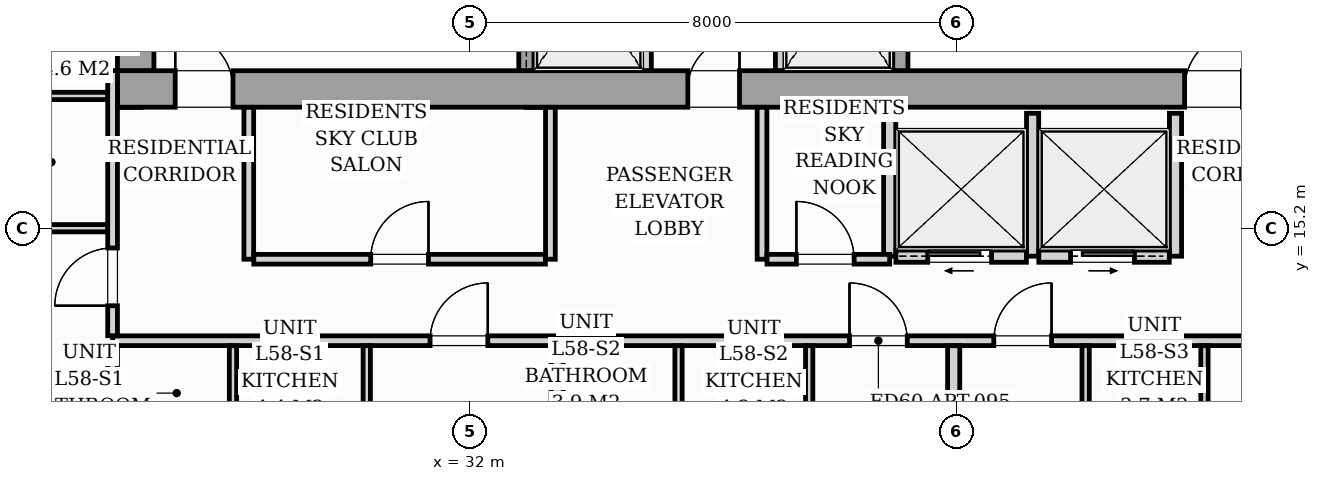
"""IFC4 building model, lengths in metres.
Left out: names, types, materials, properties, quantities, classifications, styles, units other than length and angle.
Written with IfcOpenShell. Run it as: python <this file> out.ifc"""

import sys

from ifc_helpers import new_model, si_unit, direction, frame, frame_2d, origin, origin_2d, place, context, subcontext, project, spatial, rectangle, i_section, extrude, source, transform, mapped, element, fill, save


model = new_model("IFC4")
c1 = context("Model", 3, precision=1e-05, world=origin(), true_north=direction((0.0, 1.0)))
c2 = subcontext(c1, "Body", "Model", "MODEL_VIEW")
j1 = project(units=[si_unit("LENGTHUNIT", "METRE"), si_unit("PLANEANGLEUNIT", "RADIAN")], contexts=[c1])
p1 = place(None, origin())
s1 = spatial("IfcSite", under=j1, at=p1, CompositionType="ELEMENT")
p2 = place(p1, origin())
s2 = spatial("IfcBuilding", under=s1, at=p2, CompositionType="ELEMENT")
p3 = place(p2, frame((0.0, 0.0, 201.8)))
s3 = spatial("IfcBuildingStorey", under=s2, at=p3, CompositionType="ELEMENT", Elevation=201.8)
m1 = source(origin(), c2, "Body", "SweptSolid", [
    extrude(i_section(OverallWidth=0.416, OverallDepth=0.446, WebThickness=0.039, FlangeThickness=0.063, FilletRadius=0.018, at=origin_2d()), origin(), (0.0, 0.0, 1.0), 3.196),
])
for number, where, z_axis, x_axis in (
    (1, (26.4, 17.4, 0.002), (0.0, 0.0, 1.0), (1.0, 0.0, 0.0)),
    (2, (33.12, 17.4, 0.002), (0.0, 0.0, 1.0), (1.0, 0.0, 0.0)),
    (3, (38.88, 17.4, 0.002), (0.0, 0.0, 1.0), (1.0, 0.0, 0.0)),
):
    element("IfcColumn", number, at=place(p3, frame(where, z_axis=z_axis, x_axis=x_axis)), inside=s3, PredefinedType="PILASTER", context=c2, shape_type="MappedRepresentation", body=[
        mapped(m1, transform((0.0, 0.0, 0.0), scale=1.0)),
    ])
p4 = place(p3, frame((26.2, 17.5, 0.0), z_axis=(0.0, 0.0, 1.0), x_axis=(1.0, 0.0, 0.0)))
e4 = element("IfcWall", 4, at=p4, inside=s3, PredefinedType="SHEAR", context=c2, shape_type="SweptSolid", body=[
    extrude(rectangle(XDim=19.6, YDim=0.6, at=frame_2d((9.8, 0.0))), origin(), (0.0, 0.0, 1.0), 3.2),
])
p5 = place(p4, frame((0.95, 0.0, 0.0)))
e5 = element("IfcOpeningElement", 5, at=p5, cuts=e4, PredefinedType="OPENING", context=c2, shape_type="SweptSolid", body=[
    extrude(rectangle(XDim=0.95, YDim=2.06, at=frame_2d((0.475, 1.03))), frame((0.0, 0.31, 0.0), z_axis=(0.0, -1.0, 0.0), x_axis=(1.0, 0.0, 0.0)), (0.0, 0.0, 1.0), 0.62),
])
p6 = place(p4, frame((9.38, 0.0, 0.0)))
e6 = element("IfcOpeningElement", 6, at=p6, cuts=e4, PredefinedType="OPENING", context=c2, shape_type="SweptSolid", body=[
    extrude(rectangle(XDim=0.85, YDim=2.0, at=frame_2d((0.425, 1.0))), frame((0.0, 0.31, 0.0), z_axis=(0.0, -1.0, 0.0), x_axis=(1.0, 0.0, 0.0)), (0.0, 0.0, 1.0), 0.62),
])
p7 = place(p4, frame((17.55, 0.0, 0.0)))
e7 = element("IfcOpeningElement", 7, at=p7, cuts=e4, PredefinedType="OPENING", context=c2, shape_type="SweptSolid", body=[
    extrude(rectangle(XDim=0.95, YDim=2.06, at=frame_2d((0.475, 1.03))), frame((0.0, 0.31, 0.0), z_axis=(0.0, -1.0, 0.0), x_axis=(1.0, 0.0, 0.0)), (0.0, 0.0, 1.0), 0.62),
])
p8 = place(p3, frame((26.5, 17.802, 0.0), z_axis=(0.0, 0.0, 1.0), x_axis=(0.0, 1.0, 0.0)))
e8 = element("IfcWall", 8, at=p8, inside=s3, PredefinedType="SHEAR", context=c2, shape_type="SweptSolid", body=[
    extrude(rectangle(XDim=5.796, YDim=0.6, at=frame_2d((2.898, 0.0))), origin(), (0.0, 0.0, 1.0), 3.2),
])
p9 = place(p3, frame((32.925, 17.802, 0.0), z_axis=(0.0, 0.0, 1.0), x_axis=(0.0, 1.0, 0.0)))
e9 = element("IfcWall", 9, at=p9, inside=s3, PredefinedType="SOLIDWALL", context=c2, shape_type="SweptSolid", body=[
    extrude(rectangle(XDim=2.646, YDim=0.25, at=frame_2d((1.323, 0.0))), origin(), (0.0, 0.0, 1.0), 3.2),
])
p10 = place(p9, frame((0.548, 0.0, 0.0)))
e10 = element("IfcOpeningElement", 10, at=p10, cuts=e9, PredefinedType="OPENING", context=c2, shape_type="SweptSolid", body=[
    extrude(rectangle(XDim=1.1, YDim=2.08, at=frame_2d((0.55, 1.04))), frame((0.0, 0.135, 0.0), z_axis=(0.0, -1.0, 0.0), x_axis=(1.0, 0.0, 0.0)), (0.0, 0.0, 1.0), 0.27),
])
for number, where, z_axis, x_axis in (
    (11, (34.9, 17.802, 0.0), (0.0, 0.0, 1.0), (0.0, 1.0, 0.0)),
    (12, (37.1, 17.802, 0.0), (0.0, 0.0, 1.0), (0.0, 1.0, 0.0)),
):
    element("IfcWall", number, at=place(p3, frame(where, z_axis=z_axis, x_axis=x_axis)), inside=s3, PredefinedType="PARTITIONING", context=c2, shape_type="SweptSolid", body=[
        extrude(rectangle(XDim=2.646, YDim=0.16, at=frame_2d((1.323, 0.0))), origin(), (0.0, 0.0, 1.0), 2.94),
    ])
p11 = place(p3, frame((39.075, 17.802, 0.0), z_axis=(0.0, 0.0, 1.0), x_axis=(0.0, 1.0, 0.0)))
e13 = element("IfcWall", 13, at=p11, inside=s3, PredefinedType="SOLIDWALL", context=c2, shape_type="SweptSolid", body=[
    extrude(rectangle(XDim=2.646, YDim=0.25, at=frame_2d((1.323, 0.0))), origin(), (0.0, 0.0, 1.0), 3.2),
])
p12 = place(p11, frame((0.548, 0.0, 0.0)))
e14 = element("IfcOpeningElement", 14, at=p12, cuts=e13, PredefinedType="OPENING", context=c2, shape_type="SweptSolid", body=[
    extrude(rectangle(XDim=1.1, YDim=2.08, at=frame_2d((0.55, 1.04))), frame((0.0, 0.135, 0.0), z_axis=(0.0, -1.0, 0.0), x_axis=(1.0, 0.0, 0.0)), (0.0, 0.0, 1.0), 0.27),
])
for number, where, z_axis, x_axis in (
    (15, (38.9, 14.75, 0.0), (0.0, 0.0, 1.0), (0.0, 1.0, 0.0)),
    (16, (41.25, 14.75, 0.0), (0.0, 0.0, 1.0), (0.0, 1.0, 0.0)),
    (17, (43.6, 14.75, 0.0), (0.0, 0.0, 1.0), (0.0, 1.0, 0.0)),
):
    element("IfcWall", number, at=place(p3, frame(where, z_axis=z_axis, x_axis=x_axis)), inside=s3, PredefinedType="PARTITIONING", context=c2, shape_type="SweptSolid", body=[
        extrude(rectangle(XDim=2.35, YDim=0.2, at=frame_2d((1.175, 0.0))), origin(), (0.0, 0.0, 1.0), 2.94),
    ])
p13 = place(p3, frame((39.002, 14.75, 0.0), z_axis=(0.0, 0.0, 1.0), x_axis=(1.0, 0.0, 0.0)))
e18 = element("IfcWall", 18, at=p13, inside=s3, PredefinedType="PARTITIONING", context=c2, shape_type="SweptSolid", body=[
    extrude(rectangle(XDim=2.146, YDim=0.2, at=frame_2d((1.073, 0.0))), origin(), (0.0, 0.0, 1.0), 2.94),
])
p14 = place(p13, frame((0.523, 0.0, 0.0)))
e19 = element("IfcOpeningElement", 19, at=p14, cuts=e18, PredefinedType="OPENING", context=c2, shape_type="SweptSolid", body=[
    extrude(rectangle(XDim=1.05, YDim=2.08, at=frame_2d((0.525, 1.04))), frame((0.0, 0.11, 0.0), z_axis=(0.0, -1.0, 0.0), x_axis=(1.0, 0.0, 0.0)), (0.0, 0.0, 1.0), 0.22),
])
p15 = place(p3, frame((41.352, 14.75, 0.0), z_axis=(0.0, 0.0, 1.0), x_axis=(1.0, 0.0, 0.0)))
e20 = element("IfcWall", 20, at=p15, inside=s3, PredefinedType="PARTITIONING", context=c2, shape_type="SweptSolid", body=[
    extrude(rectangle(XDim=2.146, YDim=0.2, at=frame_2d((1.073, 0.0))), origin(), (0.0, 0.0, 1.0), 2.94),
])
p16 = place(p15, frame((0.523, 0.0, 0.0)))
e21 = element("IfcOpeningElement", 21, at=p16, cuts=e20, PredefinedType="OPENING", context=c2, shape_type="SweptSolid", body=[
    extrude(rectangle(XDim=1.05, YDim=2.08, at=frame_2d((0.525, 1.04))), frame((0.0, 0.11, 0.0), z_axis=(0.0, -1.0, 0.0), x_axis=(1.0, 0.0, 0.0)), (0.0, 0.0, 1.0), 0.22),
])
p17 = place(p3, frame((26.12, 13.36, 0.0), z_axis=(0.0, 0.0, 1.0), x_axis=(1.0, 0.0, 0.0)))
e22 = element("IfcWall", 22, at=p17, inside=s3, PredefinedType="PARTITIONING", context=c2, shape_type="SweptSolid", body=[
    extrude(rectangle(XDim=19.76, YDim=0.16, at=frame_2d((9.88, 0.0))), origin(), (0.0, 0.0, 1.0), 2.94),
])
p18 = place(p17, frame((5.221, 0.0, 0.0)))
e23 = element("IfcOpeningElement", 23, at=p18, cuts=e22, PredefinedType="OPENING", context=c2, shape_type="SweptSolid", body=[
    extrude(rectangle(XDim=0.95, YDim=2.06, at=frame_2d((0.475, 1.03))), frame((0.0, 0.09, 0.0), z_axis=(0.0, -1.0, 0.0), x_axis=(1.0, 0.0, 0.0)), (0.0, 0.0, 1.0), 0.18),
])
p19 = place(p17, frame((12.119, 0.0, 0.0)))
e24 = element("IfcOpeningElement", 24, at=p19, cuts=e22, PredefinedType="OPENING", context=c2, shape_type="SweptSolid", body=[
    extrude(rectangle(XDim=0.95, YDim=2.06, at=frame_2d((0.475, 1.03))), frame((0.0, 0.09, 0.0), z_axis=(0.0, -1.0, 0.0), x_axis=(1.0, 0.0, 0.0)), (0.0, 0.0, 1.0), 0.18),
])
p20 = place(p17, frame((14.492, 0.0, 0.0)))
e25 = element("IfcOpeningElement", 25, at=p20, cuts=e22, PredefinedType="OPENING", context=c2, shape_type="SweptSolid", body=[
    extrude(rectangle(XDim=0.95, YDim=2.06, at=frame_2d((0.475, 1.03))), frame((0.0, 0.09, 0.0), z_axis=(0.0, -1.0, 0.0), x_axis=(1.0, 0.0, 0.0)), (0.0, 0.0, 1.0), 0.18),
])
p21 = place(p3, frame((26.12, 7.261, 0.0), z_axis=(0.0, 0.0, 1.0), x_axis=(0.0, 1.0, 0.0)))
e26 = element("IfcWall", 26, at=p21, inside=s3, PredefinedType="PARTITIONING", context=c2, shape_type="SweptSolid", body=[
    extrude(rectangle(XDim=6.017, YDim=0.16, at=frame_2d((3.008, 0.0))), origin(), (0.0, 0.0, 1.0), 2.94),
])
p22 = place(p3, frame((26.12, 13.442, 0.0), z_axis=(0.0, 0.0, 1.0), x_axis=(0.0, 1.0, 0.0)))
e27 = element("IfcWall", 27, at=p22, inside=s3, PredefinedType="PARTITIONING", context=c2, shape_type="SweptSolid", body=[
    extrude(rectangle(XDim=4.36, YDim=0.16, at=frame_2d((2.18, 0.0))), origin(), (0.0, 0.0, 1.0), 2.94),
])
p23 = place(p22, frame((0.493, 0.0, 0.0)))
e28 = element("IfcOpeningElement", 28, at=p23, cuts=e27, PredefinedType="OPENING", context=c2, shape_type="SweptSolid", body=[
    extrude(rectangle(XDim=0.95, YDim=2.06, at=frame_2d((0.475, 1.03))), frame((0.0, 0.09, 0.0), z_axis=(0.0, -1.0, 0.0), x_axis=(1.0, 0.0, 0.0)), (0.0, 0.0, 1.0), 0.18),
])
for number, where, z_axis, x_axis in (
    (29, (30.3, 11.172, 0.0), (0.0, 0.0, 1.0), (0.0, 1.0, 0.0)),
    (30, (28.1, 11.172, 0.0), (0.0, 0.0, 1.0), (0.0, 1.0, 0.0)),
):
    element("IfcWall", number, at=place(p3, frame(where, z_axis=z_axis, x_axis=x_axis)), inside=s3, PredefinedType="PARTITIONING", context=c2, shape_type="SweptSolid", body=[
        extrude(rectangle(XDim=2.106, YDim=0.12, at=frame_2d((1.053, 0.0))), origin(), (0.0, 0.0, 1.0), 2.94),
    ])
p24 = place(p3, frame((33.431, 7.782, 0.0), z_axis=(0.0, 0.0, 1.0), x_axis=(0.0, 1.0, 0.0)))
e31 = element("IfcWall", 31, at=p24, inside=s3, PredefinedType="PARTITIONING", context=c2, shape_type="SweptSolid", body=[
    extrude(rectangle(XDim=5.496, YDim=0.2, at=frame_2d((2.748, 0.0))), origin(), (0.0, 0.0, 1.0), 2.94),
])
for number, where, z_axis, x_axis in (
    (32, (37.576, 11.172, 0.0), (0.0, 0.0, 1.0), (0.0, 1.0, 0.0)),
    (33, (35.427, 11.172, 0.0), (0.0, 0.0, 1.0), (0.0, 1.0, 0.0)),
):
    element("IfcWall", number, at=place(p3, frame(where, z_axis=z_axis, x_axis=x_axis)), inside=s3, PredefinedType="PARTITIONING", context=c2, shape_type="SweptSolid", body=[
        extrude(rectangle(XDim=2.106, YDim=0.12, at=frame_2d((1.053, 0.0))), origin(), (0.0, 0.0, 1.0), 2.94),
    ])
p25 = place(p3, frame((39.952, 8.41, 0.0), z_axis=(0.0, 0.0, 1.0), x_axis=(0.0, 1.0, 0.0)))
e34 = element("IfcWall", 34, at=p25, inside=s3, PredefinedType="PARTITIONING", context=c2, shape_type="SweptSolid", body=[
    extrude(rectangle(XDim=4.868, YDim=0.2, at=frame_2d((2.434, 0.0))), origin(), (0.0, 0.0, 1.0), 2.94),
])
for number, where, z_axis, x_axis in (
    (35, (42.122, 11.279, 0.0), (0.0, 0.0, 1.0), (0.0, 1.0, 0.0)),
    (36, (44.076, 11.279, 0.0), (0.0, 0.0, 1.0), (0.0, 1.0, 0.0)),
):
    element("IfcWall", number, at=place(p3, frame(where, z_axis=z_axis, x_axis=x_axis)), inside=s3, PredefinedType="PARTITIONING", context=c2, shape_type="SweptSolid", body=[
        extrude(rectangle(XDim=1.999, YDim=0.12, at=frame_2d((1.0, 0.0))), origin(), (0.0, 0.0, 1.0), 2.94),
    ])
p26 = place(p3, frame((23.782, 17.385, 0.0), z_axis=(0.0, 0.0, 1.0), x_axis=(1.0, 0.0, 0.0)))
e37 = element("IfcWall", 37, at=p26, inside=s3, PredefinedType="PARTITIONING", context=c2, shape_type="SweptSolid", body=[
    extrude(rectangle(XDim=2.256, YDim=0.12, at=frame_2d((1.128, 0.0))), origin(), (0.0, 0.0, 1.0), 2.281),
])
p27 = place(p3, frame((23.782, 15.21, 0.0), z_axis=(0.0, 0.0, 1.0), x_axis=(1.0, 0.0, 0.0)))
e38 = element("IfcWall", 38, at=p27, inside=s3, PredefinedType="PARTITIONING", context=c2, shape_type="SweptSolid", body=[
    extrude(rectangle(XDim=2.256, YDim=0.12, at=frame_2d((1.128, 0.0))), origin(), (0.0, 0.0, 1.0), 2.94),
])
for number, where, z_axis, x_axis in (
    (39, (28.36, 14.7, 0.0), (0.0, 0.0, 1.0), (0.0, 1.0, 0.0)),
    (40, (33.32, 14.7, 0.0), (0.0, 0.0, 1.0), (0.0, 1.0, 0.0)),
):
    element("IfcWall", number, at=place(p3, frame(where, z_axis=z_axis, x_axis=x_axis)), inside=s3, PredefinedType="PARTITIONING", context=c2, shape_type="SweptSolid", body=[
        extrude(rectangle(XDim=2.498, YDim=0.16, at=frame_2d((1.249, 0.0))), origin(), (0.0, 0.0, 1.0), 2.94),
    ])
p28 = place(p3, frame((28.442, 14.7, 0.0), z_axis=(0.0, 0.0, 1.0), x_axis=(1.0, 0.0, 0.0)))
e41 = element("IfcWall", 41, at=p28, inside=s3, PredefinedType="PARTITIONING", context=c2, shape_type="SweptSolid", body=[
    extrude(rectangle(XDim=4.796, YDim=0.16, at=frame_2d((2.398, 0.0))), origin(), (0.0, 0.0, 1.0), 2.94),
])
p29 = place(p28, frame((1.923, 0.0, 0.0)))
e42 = element("IfcOpeningElement", 42, at=p29, cuts=e41, PredefinedType="OPENING", context=c2, shape_type="SweptSolid", body=[
    extrude(rectangle(XDim=0.95, YDim=2.06, at=frame_2d((0.475, 1.03))), frame((0.0, 0.09, 0.0), z_axis=(0.0, -1.0, 0.0), x_axis=(1.0, 0.0, 0.0)), (0.0, 0.0, 1.0), 0.18),
])
p30 = place(p3, frame((36.8, 14.7, 0.0), z_axis=(0.0, 0.0, 1.0), x_axis=(0.0, 1.0, 0.0)))
e43 = element("IfcWall", 43, at=p30, inside=s3, PredefinedType="PARTITIONING", context=c2, shape_type="SweptSolid", body=[
    extrude(rectangle(XDim=2.498, YDim=0.16, at=frame_2d((1.249, 0.0))), origin(), (0.0, 0.0, 1.0), 2.94),
])
p31 = place(p3, frame((36.882, 14.7, 0.0), z_axis=(0.0, 0.0, 1.0), x_axis=(1.0, 0.0, 0.0)))
e44 = element("IfcWall", 44, at=p31, inside=s3, PredefinedType="PARTITIONING", context=c2, shape_type="SweptSolid", body=[
    extrude(rectangle(XDim=2.018, YDim=0.16, at=frame_2d((1.009, 0.0))), origin(), (0.0, 0.0, 1.0), 2.94),
])
p32 = place(p31, frame((0.483, 0.0, 0.0)))
e45 = element("IfcOpeningElement", 45, at=p32, cuts=e44, PredefinedType="OPENING", context=c2, shape_type="SweptSolid", body=[
    extrude(rectangle(XDim=0.95, YDim=2.06, at=frame_2d((0.475, 1.03))), frame((0.0, 0.09, 0.0), z_axis=(0.0, -1.0, 0.0), x_axis=(1.0, 0.0, 0.0)), (0.0, 0.0, 1.0), 0.18),
])
m2 = source(origin(), c2, "Body", "SweptSolid", [
    extrude(rectangle(XDim=0.95, YDim=2.06, at=frame_2d((0.475, 1.03))), frame((0.0, 0.025, 0.0), z_axis=(0.0, -1.0, 0.0), x_axis=(1.0, 0.0, 0.0)), (0.0, 0.0, 1.0), 0.05),
])
p33 = place(p5, origin())
e46 = element("IfcDoor", 46, at=p33, inside=s3, OperationType="SINGLE_SWING_LEFT", PredefinedType="DOOR", context=c2, shape_type="MappedRepresentation", body=[
    mapped(m2, transform((0.0, 0.0, 0.0), scale=1.0)),
])
fill(e5, e46)
m3 = source(origin(), c2, "Body", "SweptSolid", [
    extrude(rectangle(XDim=0.85, YDim=2.0, at=frame_2d((0.425, 1.0))), frame((0.0, 0.025, 0.0), z_axis=(0.0, -1.0, 0.0), x_axis=(1.0, 0.0, 0.0)), (0.0, 0.0, 1.0), 0.05),
])
p34 = place(p6, origin())
e47 = element("IfcDoor", 47, at=p34, inside=s3, OperationType="SINGLE_SWING_RIGHT", PredefinedType="DOOR", context=c2, shape_type="MappedRepresentation", body=[
    mapped(m3, transform((0.0, 0.0, 0.0), scale=1.0)),
])
fill(e6, e47)
p35 = place(p7, origin())
e48 = element("IfcDoor", 48, at=p35, inside=s3, OperationType="SINGLE_SWING_RIGHT", PredefinedType="DOOR", context=c2, shape_type="MappedRepresentation", body=[
    mapped(m2, transform((0.0, 0.0, 0.0), scale=1.0)),
])
fill(e7, e48)
m4 = source(origin(), c2, "Body", "SweptSolid", [
    extrude(rectangle(XDim=1.05, YDim=2.08, at=frame_2d((0.525, 1.04))), frame((0.0, 0.025, 0.0), z_axis=(0.0, -1.0, 0.0), x_axis=(1.0, 0.0, 0.0)), (0.0, 0.0, 1.0), 0.05),
])
p36 = place(p14, origin())
e49 = element("IfcDoor", 49, at=p36, inside=s3, OperationType="SLIDING_TO_LEFT", PredefinedType="DOOR", context=c2, shape_type="MappedRepresentation", body=[
    mapped(m4, transform((0.0, 0.0, 0.0), scale=1.0)),
])
fill(e19, e49)
p37 = place(p16, origin())
e50 = element("IfcDoor", 50, at=p37, inside=s3, OperationType="SLIDING_TO_RIGHT", PredefinedType="DOOR", context=c2, shape_type="MappedRepresentation", body=[
    mapped(m4, transform((0.0, 0.0, 0.0), scale=1.0)),
])
fill(e21, e50)
m5 = source(origin(), c2, "Body", "SweptSolid", [
    extrude(rectangle(XDim=0.95, YDim=2.06, at=frame_2d((0.475, 1.03))), frame((0.0, 0.025, 0.0), z_axis=(0.0, -1.0, 0.0), x_axis=(1.0, 0.0, 0.0)), (0.0, 0.0, 1.0), 0.05),
])
p38 = place(p18, origin())
e51 = element("IfcDoor", 51, at=p38, inside=s3, OperationType="SINGLE_SWING_RIGHT", PredefinedType="DOOR", context=c2, shape_type="MappedRepresentation", body=[
    mapped(m5, transform((0.0, 0.0, 0.0), scale=1.0)),
])
fill(e23, e51)
p39 = place(p19, origin())
e52 = element("IfcDoor", 52, at=p39, inside=s3, OperationType="SINGLE_SWING_LEFT", PredefinedType="DOOR", context=c2, shape_type="MappedRepresentation", body=[
    mapped(m5, transform((0.0, 0.0, 0.0), scale=1.0)),
])
fill(e24, e52)
p40 = place(p20, origin())
e53 = element("IfcDoor", 53, at=p40, inside=s3, OperationType="SINGLE_SWING_RIGHT", PredefinedType="DOOR", context=c2, shape_type="MappedRepresentation", body=[
    mapped(m5, transform((0.0, 0.0, 0.0), scale=1.0)),
])
fill(e25, e53)
p41 = place(p23, origin())
e54 = element("IfcDoor", 54, at=p41, inside=s3, OperationType="SINGLE_SWING_LEFT", PredefinedType="DOOR", context=c2, shape_type="MappedRepresentation", body=[
    mapped(m5, transform((0.0, 0.0, 0.0), scale=1.0)),
])
fill(e28, e54)
p42 = place(p29, origin())
e55 = element("IfcDoor", 55, at=p42, inside=s3, OperationType="SINGLE_SWING_RIGHT", PredefinedType="DOOR", context=c2, shape_type="MappedRepresentation", body=[
    mapped(m5, transform((0.0, 0.0, 0.0), scale=1.0)),
])
fill(e42, e55)
p43 = place(p32, origin())
e56 = element("IfcDoor", 56, at=p43, inside=s3, OperationType="SINGLE_SWING_LEFT", PredefinedType="DOOR", context=c2, shape_type="MappedRepresentation", body=[
    mapped(m5, transform((0.0, 0.0, 0.0), scale=1.0)),
])
fill(e45, e56)
save(model, sys.argv[1])
